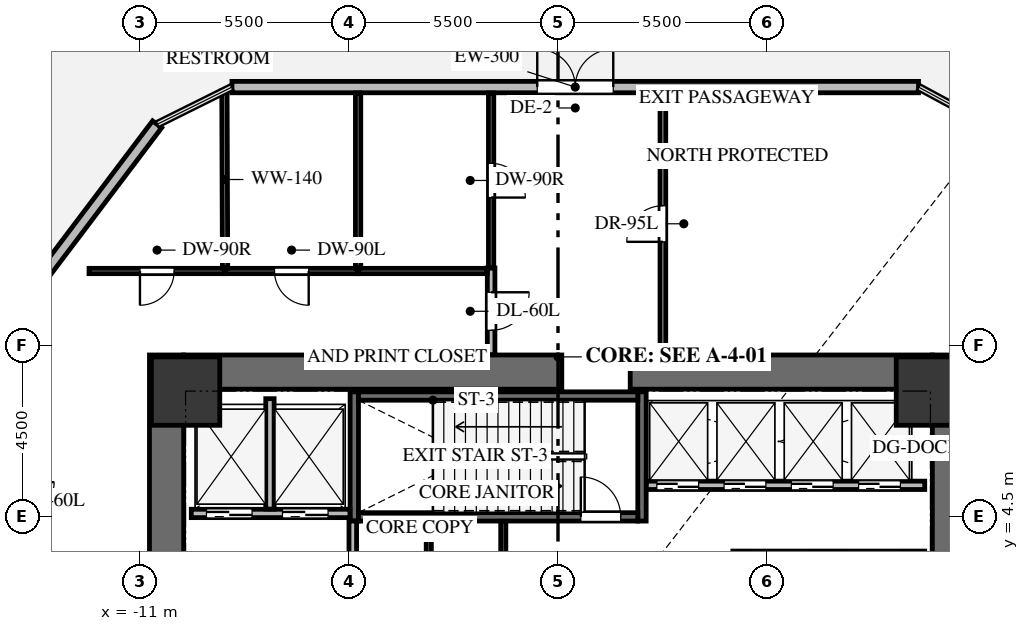
"""IFC4 building model, lengths in metres.
Left out: names, types, materials, properties, quantities, classifications, styles, units other than length and angle.
Written with IfcOpenShell. Run it as: python <this file> out.ifc"""

import sys

from ifc_helpers import new_model, si_unit, direction, frame, frame_2d, origin, origin_2d, place, context, subcontext, project, spatial, rectangle, extrude, source, transform, mapped, element, fill, save


model = new_model("IFC4")
c1 = context("Model", 3, precision=1e-05, world=origin(), true_north=direction((0.0, 1.0)))
c2 = subcontext(c1, "Body", "Model", "MODEL_VIEW")
j1 = project(units=[si_unit("LENGTHUNIT", "METRE"), si_unit("PLANEANGLEUNIT", "RADIAN")], contexts=[c1])
p1 = place(None, origin())
s1 = spatial("IfcSite", under=j1, at=p1, CompositionType="ELEMENT")
p2 = place(p1, origin())
s2 = spatial("IfcBuilding", under=s1, at=p2, CompositionType="ELEMENT")
p3 = place(p2, origin())
s3 = spatial("IfcBuildingStorey", under=s2, at=p3, CompositionType="ELEMENT", Elevation=0.0)
p4 = place(p3, frame((-10.3, -8.75, 0.0), z_axis=(0.0, 0.0, 1.0), x_axis=(0.0, 1.0, 0.0)))
e1 = element("IfcWall", 1, at=p4, inside=s3, PredefinedType="SHEAR", context=c2, shape_type="SweptSolid", body=[
    extrude(rectangle(XDim=17.5, YDim=0.9, at=frame_2d((8.75, 0.0))), origin(), (0.0, 0.0, 1.0), 5.2),
])
p5 = place(p3, frame((10.3, -0.15, 0.0), z_axis=(0.0, 0.0, 1.0), x_axis=(0.0, 1.0, 0.0)))
e2 = element("IfcWall", 2, at=p5, inside=s3, PredefinedType="SHEAR", context=c2, shape_type="SweptSolid", body=[
    extrude(rectangle(XDim=8.9, YDim=0.9, at=frame_2d((4.45, 0.0))), origin(), (0.0, 0.0, 1.0), 5.2),
])
p6 = place(p3, frame((-9.85, 8.3, 0.0), z_axis=(0.0, 0.0, 1.0), x_axis=(1.0, 0.0, 0.0)))
e3 = element("IfcWall", 3, at=p6, inside=s3, PredefinedType="SHEAR", context=c2, shape_type="SweptSolid", body=[
    extrude(rectangle(XDim=9.95, YDim=0.9, at=frame_2d((4.975, 0.0))), origin(), (0.0, 0.0, 1.0), 5.2),
])
p7 = place(p3, frame((1.9, 8.3, 0.0), z_axis=(0.0, 0.0, 1.0), x_axis=(1.0, 0.0, 0.0)))
e4 = element("IfcWall", 4, at=p7, inside=s3, PredefinedType="SHEAR", context=c2, shape_type="SweptSolid", body=[
    extrude(rectangle(XDim=7.95, YDim=0.9, at=frame_2d((3.975, 0.0))), origin(), (0.0, 0.0, 1.0), 5.2),
])
for number, where, z_axis, x_axis in (
    (5, (2.21, 4.38, -0.3), (0.0, 0.0, 1.0), (0.0, 1.0, 0.0)),
    (6, (-5.36, 7.78, -0.3), (0.0, 0.0, 1.0), (0.0, -1.0, 0.0)),
):
    element("IfcWall", number, at=place(p3, frame(where, z_axis=z_axis, x_axis=x_axis)), inside=s3, PredefinedType="SHEAR", context=c2, shape_type="SweptSolid", body=[
        extrude(rectangle(XDim=3.4, YDim=0.22, at=frame_2d((1.7, 0.0))), origin(), (0.0, 0.0, 1.0), 5.2),
    ])
p8 = place(p3, frame((-5.25, 4.49, -0.3), z_axis=(0.0, 0.0, 1.0), x_axis=(1.0, 0.0, 0.0)))
e7 = element("IfcWall", 7, at=p8, inside=s3, PredefinedType="SHEAR", context=c2, shape_type="SweptSolid", body=[
    extrude(rectangle(XDim=7.35, YDim=0.22, at=frame_2d((3.675, 0.0))), origin(), (0.0, 0.0, 1.0), 5.2),
])
p9 = place(p8, frame((5.85, 0.0, 0.0)))
e8 = element("IfcOpeningElement", 8, at=p9, cuts=e7, PredefinedType="OPENING", context=c2, shape_type="SweptSolid", body=[
    extrude(rectangle(XDim=1.05, YDim=2.15, at=frame_2d((0.525, 1.075))), frame((0.0, 0.12, 0.0), z_axis=(0.0, -1.0, 0.0), x_axis=(1.0, 0.0, 0.0)), (0.0, 0.0, 1.0), 0.24),
])
p10 = place(p3, frame((2.1, 7.67, -0.3), z_axis=(0.0, 0.0, 1.0), x_axis=(-1.0, 0.0, 0.0)))
e9 = element("IfcWall", 9, at=p10, inside=s3, PredefinedType="SHEAR", context=c2, shape_type="SweptSolid", body=[
    extrude(rectangle(XDim=7.35, YDim=0.22, at=frame_2d((3.675, 0.0))), origin(), (0.0, 0.0, 1.0), 5.2),
])
m1 = source(origin(), c2, "Body", "SweptSolid", [
    extrude(rectangle(XDim=1.8, YDim=1.8, at=origin_2d()), origin(), (0.0, 0.0, 1.0), 5.2),
])
for number, where, z_axis, x_axis in (
    (10, (9.8, 7.8, -0.3), (0.0, 0.0, 1.0), (1.0, 0.0, 0.0)),
    (11, (-9.8, 7.8, -0.3), (0.0, 0.0, 1.0), (1.0, 0.0, 0.0)),
):
    element("IfcColumn", number, at=place(p3, frame(where, z_axis=z_axis, x_axis=x_axis)), inside=s3, PredefinedType="COLUMN", context=c2, shape_type="MappedRepresentation", body=[
        mapped(m1, transform((0.0, 0.0, 0.0), x_axis=(1.0, 0.0, 0.0), y_axis=(0.0, 1.0, 0.0), z_axis=(0.0, 0.0, 1.0), scale=1.0)),
    ])
p11 = place(p3, frame((-20.589, 1.538, 0.0), z_axis=(0.0, 0.0, 1.0), x_axis=(0.603015201292, 0.797729695455, 0.0)))
e12 = element("IfcWall", 12, at=p11, inside=s3, PredefinedType="SOLIDWALL", context=c2, shape_type="SweptSolid", body=[
    extrude(rectangle(XDim=16.65, YDim=0.3, at=frame_2d((8.325, 0.0))), origin(), (0.0, 0.0, 1.0), 4.9),
])
p12 = place(p11, frame((2.0, 0.0, 0.0)))
e13 = element("IfcOpeningElement", 13, at=p12, cuts=e12, PredefinedType="OPENING", context=c2, shape_type="SweptSolid", body=[
    extrude(rectangle(XDim=1.05, YDim=2.2, at=frame_2d((0.525, 1.1))), frame((0.0, 0.16, 0.0), z_axis=(0.0, -1.0, 0.0), x_axis=(1.0, 0.0, 0.0)), (0.0, 0.0, 1.0), 0.32),
])
p13 = place(p3, frame((-8.579, 15.8, 0.0), z_axis=(0.0, 0.0, 1.0), x_axis=(1.0, 0.0, 0.0)))
e14 = element("IfcWall", 14, at=p13, inside=s3, PredefinedType="SOLIDWALL", context=c2, shape_type="SweptSolid", body=[
    extrude(rectangle(XDim=18.065, YDim=0.3, at=frame_2d((9.033, 0.0))), origin(), (0.0, 0.0, 1.0), 4.9),
])
p14 = place(p13, frame((8.033, 0.0, 0.0)))
e15 = element("IfcOpeningElement", 15, at=p14, cuts=e14, PredefinedType="OPENING", context=c2, shape_type="SweptSolid", body=[
    extrude(rectangle(XDim=2.0, YDim=2.3, at=frame_2d((1.0, 1.15))), frame((0.0, 0.16, 0.0), z_axis=(0.0, -1.0, 0.0), x_axis=(1.0, 0.0, 0.0)), (0.0, 0.0, 1.0), 0.32),
])
p15 = place(p3, frame((-9.65, 4.58, 0.0), z_axis=(0.0, 0.0, 1.0), x_axis=(1.0, 0.0, 0.0)))
e16 = element("IfcWall", 16, at=p15, inside=s3, PredefinedType="SOLIDWALL", context=c2, shape_type="SweptSolid", body=[
    extrude(rectangle(XDim=4.175, YDim=0.22, at=frame_2d((2.087, 0.0))), origin(), (0.0, 0.0, 1.0), 4.885),
])
p16 = place(p15, frame((0.4, 0.0, 0.0)))
e17 = element("IfcOpeningElement", 17, at=p16, cuts=e16, PredefinedType="OPENING", context=c2, shape_type="SweptSolid", body=[
    extrude(rectangle(XDim=1.2, YDim=2.15, at=frame_2d((0.6, 1.075))), frame((0.0, 0.12, 0.0), z_axis=(0.0, -1.0, 0.0), x_axis=(1.0, 0.0, 0.0)), (0.0, 0.0, 1.0), 0.24),
])
p17 = place(p15, frame((2.4, 0.0, 0.0)))
e18 = element("IfcOpeningElement", 18, at=p17, cuts=e16, PredefinedType="OPENING", context=c2, shape_type="SweptSolid", body=[
    extrude(rectangle(XDim=1.2, YDim=2.15, at=frame_2d((0.6, 1.075))), frame((0.0, 0.12, 0.0), z_axis=(0.0, -1.0, 0.0), x_axis=(1.0, 0.0, 0.0)), (0.0, 0.0, 1.0), 0.24),
])
p18 = place(p3, frame((-7.58, 4.694, 0.0), z_axis=(0.0, 0.0, 1.0), x_axis=(0.0, 1.0, 0.0)))
e19 = element("IfcWall", 19, at=p18, inside=s3, PredefinedType="SOLIDWALL", context=c2, shape_type="SweptSolid", body=[
    extrude(rectangle(XDim=2.906, YDim=0.22, at=frame_2d((1.453, 0.0))), origin(), (0.0, 0.0, 1.0), 4.885),
])
p19 = place(p3, frame((-5.4, 0.354, 0.0), z_axis=(0.0, 0.0, 1.0), x_axis=(0.0, 1.0, 0.0)))
e20 = element("IfcWall", 20, at=p19, inside=s3, PredefinedType="SOLIDWALL", context=c2, shape_type="SweptSolid", body=[
    extrude(rectangle(XDim=4.026, YDim=0.2, at=frame_2d((2.013, 0.0))), origin(), (0.0, 0.0, 1.0), 4.885),
])
p20 = place(p19, frame((0.246, 0.0, 0.0)))
e21 = element("IfcOpeningElement", 21, at=p20, cuts=e20, PredefinedType="OPENING", context=c2, shape_type="SweptSolid", body=[
    extrude(rectangle(XDim=1.0, YDim=2.15, at=frame_2d((0.5, 1.075))), frame((0.0, 0.11, 0.0), z_axis=(0.0, -1.0, 0.0), x_axis=(1.0, 0.0, 0.0)), (0.0, 0.0, 1.0), 0.22),
])
p21 = place(p3, frame((2.325, 5.32, 0.0), z_axis=(0.0, 0.0, 1.0), x_axis=(1.0, 0.0, 0.0)))
e22 = element("IfcWall", 22, at=p21, inside=s3, PredefinedType="SOLIDWALL", context=c2, shape_type="SweptSolid", body=[
    extrude(rectangle(XDim=7.325, YDim=0.22, at=frame_2d((3.663, 0.0))), origin(), (0.0, 0.0, 1.0), 4.885),
])
p22 = place(p21, frame((0.275, 0.0, 0.0)))
e23 = element("IfcOpeningElement", 23, at=p22, cuts=e22, PredefinedType="OPENING", context=c2, shape_type="SweptSolid", body=[
    extrude(rectangle(XDim=1.1, YDim=2.15, at=frame_2d((0.55, 1.075))), frame((0.0, 0.12, 0.0), z_axis=(0.0, -1.0, 0.0), x_axis=(1.0, 0.0, 0.0)), (0.0, 0.0, 1.0), 0.24),
])
p23 = place(p21, frame((2.045, 0.0, 0.0)))
e24 = element("IfcOpeningElement", 24, at=p23, cuts=e22, PredefinedType="OPENING", context=c2, shape_type="SweptSolid", body=[
    extrude(rectangle(XDim=1.1, YDim=2.15, at=frame_2d((0.55, 1.075))), frame((0.0, 0.12, 0.0), z_axis=(0.0, -1.0, 0.0), x_axis=(1.0, 0.0, 0.0)), (0.0, 0.0, 1.0), 0.24),
])
p24 = place(p21, frame((3.815, 0.0, 0.0)))
e25 = element("IfcOpeningElement", 25, at=p24, cuts=e22, PredefinedType="OPENING", context=c2, shape_type="SweptSolid", body=[
    extrude(rectangle(XDim=1.1, YDim=2.15, at=frame_2d((0.55, 1.075))), frame((0.0, 0.12, 0.0), z_axis=(0.0, -1.0, 0.0), x_axis=(1.0, 0.0, 0.0)), (0.0, 0.0, 1.0), 0.24),
])
p25 = place(p21, frame((5.585, 0.0, 0.0)))
e26 = element("IfcOpeningElement", 26, at=p25, cuts=e22, PredefinedType="OPENING", context=c2, shape_type="SweptSolid", body=[
    extrude(rectangle(XDim=1.1, YDim=2.15, at=frame_2d((0.55, 1.075))), frame((0.0, 0.12, 0.0), z_axis=(0.0, -1.0, 0.0), x_axis=(1.0, 0.0, 0.0)), (0.0, 0.0, 1.0), 0.24),
])
p26 = place(p3, frame((-1.76, 11.04, 0.0), z_axis=(0.0, 0.0, 1.0), x_axis=(0.0, -1.0, 0.0)))
e27 = element("IfcWall", 27, at=p26, inside=s3, PredefinedType="SOLIDWALL", context=c2, shape_type="SweptSolid", body=[
    extrude(rectangle(XDim=2.28, YDim=0.2, at=frame_2d((1.14, 0.0))), origin(), (0.0, 0.0, 1.0), 4.885),
])
p27 = place(p26, frame((0.64, 0.0, 0.0)))
e28 = element("IfcOpeningElement", 28, at=p27, cuts=e27, PredefinedType="OPENING", context=c2, shape_type="SweptSolid", body=[
    extrude(rectangle(XDim=1.0, YDim=2.15, at=frame_2d((0.5, 1.075))), frame((0.0, 0.11, 0.0), z_axis=(0.0, -1.0, 0.0), x_axis=(1.0, 0.0, 0.0)), (0.0, 0.0, 1.0), 0.22),
])
p28 = place(p3, frame((-8.76, 10.96, 0.0), z_axis=(0.0, 0.0, 1.0), x_axis=(-1.0, 0.0, 0.0)))
e29 = element("IfcWall", 29, at=p28, inside=s3, PredefinedType="PARTITIONING", context=c2, shape_type="SweptSolid", body=[
    extrude(rectangle(XDim=3.58, YDim=0.14, at=frame_2d((1.79, 0.0))), origin(), (0.0, 0.0, 1.0), 4.885),
])
p29 = place(p28, frame((1.34, 0.0, 0.0)))
e30 = element("IfcOpeningElement", 30, at=p29, cuts=e29, PredefinedType="OPENING", context=c2, shape_type="SweptSolid", body=[
    extrude(rectangle(XDim=0.9, YDim=2.05, at=frame_2d((0.45, 1.025))), frame((0.0, 0.08, 0.0), z_axis=(0.0, -1.0, 0.0), x_axis=(1.0, 0.0, 0.0)), (0.0, 0.0, 1.0), 0.16),
])
p30 = place(p3, frame((-5.26, 10.96, 0.0), z_axis=(0.0, 0.0, 1.0), x_axis=(-1.0, 0.0, 0.0)))
e31 = element("IfcWall", 31, at=p30, inside=s3, PredefinedType="PARTITIONING", context=c2, shape_type="SweptSolid", body=[
    extrude(rectangle(XDim=3.5, YDim=0.14, at=frame_2d((1.75, 0.0))), origin(), (0.0, 0.0, 1.0), 4.885),
])
p31 = place(p30, frame((1.3, 0.0, 0.0)))
e32 = element("IfcOpeningElement", 32, at=p31, cuts=e31, PredefinedType="OPENING", context=c2, shape_type="SweptSolid", body=[
    extrude(rectangle(XDim=0.9, YDim=2.05, at=frame_2d((0.45, 1.025))), frame((0.0, 0.08, 0.0), z_axis=(0.0, -1.0, 0.0), x_axis=(1.0, 0.0, 0.0)), (0.0, 0.0, 1.0), 0.16),
])
p32 = place(p3, frame((-1.864, 10.96, 0.0), z_axis=(0.0, 0.0, 1.0), x_axis=(-1.0, 0.0, 0.0)))
e33 = element("IfcWall", 33, at=p32, inside=s3, PredefinedType="PARTITIONING", context=c2, shape_type="SweptSolid", body=[
    extrude(rectangle(XDim=3.396, YDim=0.14, at=frame_2d((1.698, 0.0))), origin(), (0.0, 0.0, 1.0), 4.885),
])
p33 = place(p3, frame((-1.76, 15.645, 0.0), z_axis=(0.0, 0.0, 1.0), x_axis=(0.0, -1.0, 0.0)))
e34 = element("IfcWall", 34, at=p33, inside=s3, PredefinedType="PARTITIONING", context=c2, shape_type="SweptSolid", body=[
    extrude(rectangle(XDim=4.605, YDim=0.14, at=frame_2d((2.302, 0.0))), origin(), (0.0, 0.0, 1.0), 4.885),
])
p34 = place(p33, frame((1.853, 0.0, 0.0)))
e35 = element("IfcOpeningElement", 35, at=p34, cuts=e34, PredefinedType="OPENING", context=c2, shape_type="SweptSolid", body=[
    extrude(rectangle(XDim=0.9, YDim=2.05, at=frame_2d((0.45, 1.025))), frame((0.0, 0.08, 0.0), z_axis=(0.0, -1.0, 0.0), x_axis=(1.0, 0.0, 0.0)), (0.0, 0.0, 1.0), 0.16),
])
p35 = place(p3, frame((2.76, 8.76, 0.0), z_axis=(0.0, 0.0, 1.0), x_axis=(0.0, 1.0, 0.0)))
e36 = element("IfcWall", 36, at=p35, inside=s3, PredefinedType="PARTITIONING", context=c2, shape_type="SweptSolid", body=[
    extrude(rectangle(XDim=6.885, YDim=0.15, at=frame_2d((3.442, 0.0))), origin(), (0.0, 0.0, 1.0), 4.885),
])
p36 = place(p35, frame((2.968, 0.0, 0.0)))
e37 = element("IfcOpeningElement", 37, at=p36, cuts=e36, PredefinedType="OPENING", context=c2, shape_type="SweptSolid", body=[
    extrude(rectangle(XDim=0.95, YDim=2.1, at=frame_2d((0.475, 1.05))), frame((0.0, 0.085, 0.0), z_axis=(0.0, -1.0, 0.0), x_axis=(1.0, 0.0, 0.0)), (0.0, 0.0, 1.0), 0.17),
])
p37 = place(p3, frame((-3.4, 4.375, 0.0), z_axis=(0.0, 0.0, 1.0), x_axis=(0.0, -1.0, 0.0)))
e38 = element("IfcWall", 38, at=p37, inside=s3, PredefinedType="PARTITIONING", context=c2, shape_type="SweptSolid", body=[
    extrude(rectangle(XDim=2.586, YDim=0.135, at=frame_2d((1.293, 0.0))), origin(), (0.0, 0.0, 1.0), 4.885),
])
p38 = place(p3, frame((-1.44, 4.375, 0.0), z_axis=(0.0, 0.0, 1.0), x_axis=(0.0, -1.0, 0.0)))
e39 = element("IfcWall", 39, at=p38, inside=s3, PredefinedType="PARTITIONING", context=c2, shape_type="SweptSolid", body=[
    extrude(rectangle(XDim=2.561, YDim=0.135, at=frame_2d((1.281, 0.0))), origin(), (0.0, 0.0, 1.0), 4.885),
])
p39 = place(p3, frame((-8.778, 15.701, 0.0), z_axis=(0.0, 0.0, 1.0), x_axis=(0.003766254608, -0.999992907638, 0.0)))
e40 = element("IfcWall", 40, at=p39, inside=s3, PredefinedType="PARTITIONING", context=c2, shape_type="SweptSolid", body=[
    extrude(rectangle(XDim=4.667, YDim=0.14, at=frame_2d((2.333, 0.0))), origin(), (0.0, 0.0, 1.0), 4.885),
])
p40 = place(p3, frame((-5.26, 15.645, 0.0), z_axis=(0.0, 0.0, 1.0), x_axis=(0.0, -1.0, 0.0)))
e41 = element("IfcWall", 41, at=p40, inside=s3, PredefinedType="PARTITIONING", context=c2, shape_type="SweptSolid", body=[
    extrude(rectangle(XDim=4.611, YDim=0.14, at=frame_2d((2.306, 0.0))), origin(), (0.0, 0.0, 1.0), 4.885),
])
m2 = source(origin(), c2, "Body", "SweptSolid", [
    extrude(rectangle(XDim=2.0, YDim=2.3, at=frame_2d((1.0, 1.15))), frame((0.0, 0.025, 0.0), z_axis=(0.0, -1.0, 0.0), x_axis=(1.0, 0.0, 0.0)), (0.0, 0.0, 1.0), 0.05),
])
p41 = place(p14, origin())
e42 = element("IfcDoor", 42, at=p41, inside=s3, OperationType="DOUBLE_DOOR_SINGLE_SWING", PredefinedType="DOOR", context=c2, shape_type="MappedRepresentation", body=[
    mapped(m2, transform((0.0, 0.0, 0.0), x_axis=(1.0, 0.0, 0.0), y_axis=(0.0, 1.0, 0.0), z_axis=(0.0, 0.0, 1.0), scale=1.0)),
])
fill(e15, e42)
m3 = source(origin(), c2, "Body", "SweptSolid", [
    extrude(rectangle(XDim=1.05, YDim=2.15, at=frame_2d((0.525, 1.075))), frame((0.0, 0.025, 0.0), z_axis=(0.0, -1.0, 0.0), x_axis=(1.0, 0.0, 0.0)), (0.0, 0.0, 1.0), 0.05),
])
p42 = place(p9, origin())
e43 = element("IfcDoor", 43, at=p42, inside=s3, OperationType="SINGLE_SWING_LEFT", PredefinedType="DOOR", context=c2, shape_type="MappedRepresentation", body=[
    mapped(m3, transform((0.0, 0.0, 0.0), x_axis=(1.0, 0.0, 0.0), y_axis=(0.0, 1.0, 0.0), z_axis=(0.0, 0.0, 1.0), scale=1.0)),
])
fill(e8, e43)
m4 = source(origin(), c2, "Body", "SweptSolid", [
    extrude(rectangle(XDim=1.2, YDim=2.15, at=frame_2d((0.6, 1.075))), frame((0.0, 0.025, 0.0), z_axis=(0.0, -1.0, 0.0), x_axis=(1.0, 0.0, 0.0)), (0.0, 0.0, 1.0), 0.05),
])
p43 = place(p16, origin())
e44 = element("IfcDoor", 44, at=p43, inside=s3, OperationType="DOUBLE_DOOR_SLIDING", PredefinedType="DOOR", context=c2, shape_type="MappedRepresentation", body=[
    mapped(m4, transform((0.0, 0.0, 0.0), x_axis=(1.0, 0.0, 0.0), y_axis=(0.0, 1.0, 0.0), z_axis=(0.0, 0.0, 1.0), scale=1.0)),
])
fill(e17, e44)
p44 = place(p17, origin())
e45 = element("IfcDoor", 45, at=p44, inside=s3, OperationType="DOUBLE_DOOR_SLIDING", PredefinedType="DOOR", context=c2, shape_type="MappedRepresentation", body=[
    mapped(m4, transform((0.0, 0.0, 0.0), x_axis=(1.0, 0.0, 0.0), y_axis=(0.0, 1.0, 0.0), z_axis=(0.0, 0.0, 1.0), scale=1.0)),
])
fill(e18, e45)
m5 = source(origin(), c2, "Body", "SweptSolid", [
    extrude(rectangle(XDim=1.1, YDim=2.15, at=frame_2d((0.55, 1.075))), frame((0.0, 0.025, 0.0), z_axis=(0.0, -1.0, 0.0), x_axis=(1.0, 0.0, 0.0)), (0.0, 0.0, 1.0), 0.05),
])
p45 = place(p22, origin())
e46 = element("IfcDoor", 46, at=p45, inside=s3, OperationType="DOUBLE_DOOR_SLIDING", PredefinedType="DOOR", context=c2, shape_type="MappedRepresentation", body=[
    mapped(m5, transform((0.0, 0.0, 0.0), x_axis=(1.0, 0.0, 0.0), y_axis=(0.0, 1.0, 0.0), z_axis=(0.0, 0.0, 1.0), scale=1.0)),
])
fill(e23, e46)
p46 = place(p23, origin())
e47 = element("IfcDoor", 47, at=p46, inside=s3, OperationType="DOUBLE_DOOR_SLIDING", PredefinedType="DOOR", context=c2, shape_type="MappedRepresentation", body=[
    mapped(m5, transform((0.0, 0.0, 0.0), x_axis=(1.0, 0.0, 0.0), y_axis=(0.0, 1.0, 0.0), z_axis=(0.0, 0.0, 1.0), scale=1.0)),
])
fill(e24, e47)
p47 = place(p24, origin())
e48 = element("IfcDoor", 48, at=p47, inside=s3, OperationType="DOUBLE_DOOR_SLIDING", PredefinedType="DOOR", context=c2, shape_type="MappedRepresentation", body=[
    mapped(m5, transform((0.0, 0.0, 0.0), x_axis=(1.0, 0.0, 0.0), y_axis=(0.0, 1.0, 0.0), z_axis=(0.0, 0.0, 1.0), scale=1.0)),
])
fill(e25, e48)
p48 = place(p25, origin())
e49 = element("IfcDoor", 49, at=p48, inside=s3, OperationType="DOUBLE_DOOR_SLIDING", PredefinedType="DOOR", context=c2, shape_type="MappedRepresentation", body=[
    mapped(m5, transform((0.0, 0.0, 0.0), x_axis=(1.0, 0.0, 0.0), y_axis=(0.0, 1.0, 0.0), z_axis=(0.0, 0.0, 1.0), scale=1.0)),
])
fill(e26, e49)
m6 = source(origin(), c2, "Body", "SweptSolid", [
    extrude(rectangle(XDim=1.0, YDim=2.15, at=frame_2d((0.5, 1.075))), frame((0.0, 0.025, 0.0), z_axis=(0.0, -1.0, 0.0), x_axis=(1.0, 0.0, 0.0)), (0.0, 0.0, 1.0), 0.05),
])
p49 = place(p27, origin())
e50 = element("IfcDoor", 50, at=p49, inside=s3, OperationType="SINGLE_SWING_LEFT", PredefinedType="DOOR", context=c2, shape_type="MappedRepresentation", body=[
    mapped(m6, transform((0.0, 0.0, 0.0), x_axis=(1.0, 0.0, 0.0), y_axis=(0.0, 1.0, 0.0), z_axis=(0.0, 0.0, 1.0), scale=1.0)),
])
fill(e28, e50)
m7 = source(origin(), c2, "Body", "SweptSolid", [
    extrude(rectangle(XDim=0.9, YDim=2.05, at=frame_2d((0.45, 1.025))), frame((0.0, 0.025, 0.0), z_axis=(0.0, -1.0, 0.0), x_axis=(1.0, 0.0, 0.0)), (0.0, 0.0, 1.0), 0.05),
])
p50 = place(p29, origin())
e51 = element("IfcDoor", 51, at=p50, inside=s3, OperationType="SINGLE_SWING_RIGHT", PredefinedType="DOOR", context=c2, shape_type="MappedRepresentation", body=[
    mapped(m7, transform((0.0, 0.0, 0.0), x_axis=(1.0, 0.0, 0.0), y_axis=(0.0, 1.0, 0.0), z_axis=(0.0, 0.0, 1.0), scale=1.0)),
])
fill(e30, e51)
m8 = source(origin(), c2, "Body", "SweptSolid", [
    extrude(rectangle(XDim=0.9, YDim=2.05, at=frame_2d((0.45, 1.025))), frame((0.0, 0.025, 0.0), z_axis=(0.0, -1.0, 0.0), x_axis=(1.0, 0.0, 0.0)), (0.0, 0.0, 1.0), 0.05),
])
p51 = place(p31, origin())
e52 = element("IfcDoor", 52, at=p51, inside=s3, OperationType="SINGLE_SWING_LEFT", PredefinedType="DOOR", context=c2, shape_type="MappedRepresentation", body=[
    mapped(m8, transform((0.0, 0.0, 0.0), x_axis=(1.0, 0.0, 0.0), y_axis=(0.0, 1.0, 0.0), z_axis=(0.0, 0.0, 1.0), scale=1.0)),
])
fill(e32, e52)
p52 = place(p34, origin())
e53 = element("IfcDoor", 53, at=p52, inside=s3, OperationType="SINGLE_SWING_RIGHT", PredefinedType="DOOR", context=c2, shape_type="MappedRepresentation", body=[
    mapped(m7, transform((0.0, 0.0, 0.0), x_axis=(1.0, 0.0, 0.0), y_axis=(0.0, 1.0, 0.0), z_axis=(0.0, 0.0, 1.0), scale=1.0)),
])
fill(e35, e53)
m9 = source(origin(), c2, "Body", "SweptSolid", [
    extrude(rectangle(XDim=0.95, YDim=2.1, at=frame_2d((0.475, 1.05))), frame((0.0, 0.025, 0.0), z_axis=(0.0, -1.0, 0.0), x_axis=(1.0, 0.0, 0.0)), (0.0, 0.0, 1.0), 0.05),
])
p53 = place(p36, origin())
e54 = element("IfcDoor", 54, at=p53, inside=s3, OperationType="SINGLE_SWING_LEFT", PredefinedType="DOOR", context=c2, shape_type="MappedRepresentation", body=[
    mapped(m9, transform((0.0, 0.0, 0.0), x_axis=(1.0, 0.0, 0.0), y_axis=(0.0, 1.0, 0.0), z_axis=(0.0, 0.0, 1.0), scale=1.0)),
])
fill(e37, e54)
save(model, sys.argv[1])
